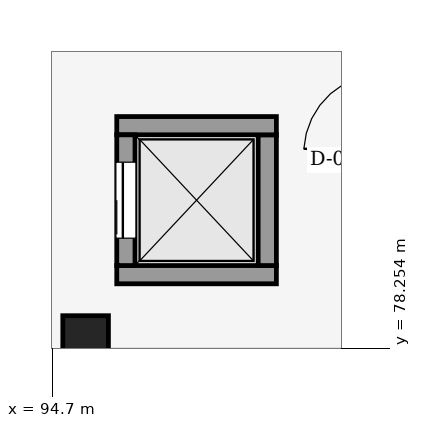
"""IFC4 building model, lengths in metres.
Left out: names, types, materials, properties, quantities, classifications, styles, units other than length and angle.
Written with IfcOpenShell. Run it as: python <this file> out.ifc"""

import sys

from ifc_helpers import new_model, si_unit, direction, frame, frame_2d, origin, origin_2d, place, context, subcontext, project, spatial, rectangle, extrude, element, fill, save


model = new_model("IFC4")
c1 = context("Model", 3, precision=1e-05, world=origin(), true_north=direction((0.0, 1.0)))
c2 = subcontext(c1, "Body", "Model", "MODEL_VIEW")
j1 = project(units=[si_unit("LENGTHUNIT", "METRE"), si_unit("PLANEANGLEUNIT", "RADIAN")], contexts=[c1])
p1 = place(None, origin())
s1 = spatial("IfcSite", under=j1, at=p1, CompositionType="ELEMENT")
p2 = place(p1, origin())
s2 = spatial("IfcBuilding", under=s1, at=p2, CompositionType="ELEMENT")
p3 = place(p2, frame((0.0, 0.0, 17.25)))
s3 = spatial("IfcBuildingStorey", under=s2, at=p3, CompositionType="ELEMENT", Elevation=17.25)
p4 = place(p3, frame((95.14, 78.38, 0.0), z_axis=(0.0, 0.0, 1.0), x_axis=(1.0, 0.0, 0.0)))
e1 = element("IfcColumn", 1, at=p4, inside=s3, PredefinedType="COLUMN", context=c2, shape_type="SweptSolid", body=[
    extrude(rectangle(XDim=0.6, YDim=0.6, at=origin_2d()), origin(), (0.0, 0.0, 1.0), 4.05),
])
p5 = place(p3, frame((97.65, 79.22, 0.0), z_axis=(0.0, 0.0, 1.0), x_axis=(-1.0, 0.0, 0.0)))
e2 = element("IfcWall", 2, at=p5, inside=s3, PredefinedType="SHEAR", context=c2, shape_type="SweptSolid", body=[
    extrude(rectangle(XDim=2.1, YDim=0.24, at=frame_2d((1.05, 0.0))), origin(), (0.0, 0.0, 1.0), 4.05),
])
p6 = place(p3, frame((97.53, 81.06, 0.0), z_axis=(0.0, 0.0, 1.0), x_axis=(0.0, -1.0, 0.0)))
e3 = element("IfcWall", 3, at=p6, inside=s3, PredefinedType="SHEAR", context=c2, shape_type="SweptSolid", body=[
    extrude(rectangle(XDim=1.72, YDim=0.24, at=frame_2d((0.86, 0.0))), origin(), (0.0, 0.0, 1.0), 4.05),
])
p7 = place(p3, frame((95.55, 81.18, 0.0), z_axis=(0.0, 0.0, 1.0), x_axis=(1.0, 0.0, 0.0)))
e4 = element("IfcWall", 4, at=p7, inside=s3, PredefinedType="SHEAR", context=c2, shape_type="SweptSolid", body=[
    extrude(rectangle(XDim=2.1, YDim=0.24, at=frame_2d((1.05, 0.0))), origin(), (0.0, 0.0, 1.0), 4.05),
])
p8 = place(p3, frame((95.67, 79.34, 0.0), z_axis=(0.0, 0.0, 1.0), x_axis=(0.0, 1.0, 0.0)))
e5 = element("IfcWall", 5, at=p8, inside=s3, PredefinedType="SHEAR", context=c2, shape_type="SweptSolid", body=[
    extrude(rectangle(XDim=1.72, YDim=0.24, at=frame_2d((0.86, 0.0))), origin(), (0.0, 0.0, 1.0), 4.05),
])
p9 = place(p8, frame((0.36, 0.0, 0.0)))
e6 = element("IfcOpeningElement", 6, at=p9, cuts=e5, PredefinedType="OPENING", context=c2, shape_type="SweptSolid", body=[
    extrude(rectangle(XDim=1.0, YDim=2.15, at=frame_2d((0.5, 1.075))), frame((0.0, 0.13, 0.0), z_axis=(0.0, -1.0, 0.0), x_axis=(1.0, 0.0, 0.0)), (0.0, 0.0, 1.0), 0.26),
])
p10 = place(p9, origin())
e7 = element("IfcDoor", 7, at=p10, inside=s3, OperationType="SLIDING_TO_LEFT", PredefinedType="DOOR", context=c2, shape_type="SweptSolid", body=[
    extrude(rectangle(XDim=1.0, YDim=2.15, at=frame_2d((0.5, 1.075))), frame((0.0, 0.025, 0.0), z_axis=(0.0, -1.0, 0.0), x_axis=(1.0, 0.0, 0.0)), (0.0, 0.0, 1.0), 0.05),
])
fill(e6, e7)
save(model, sys.argv[1])
